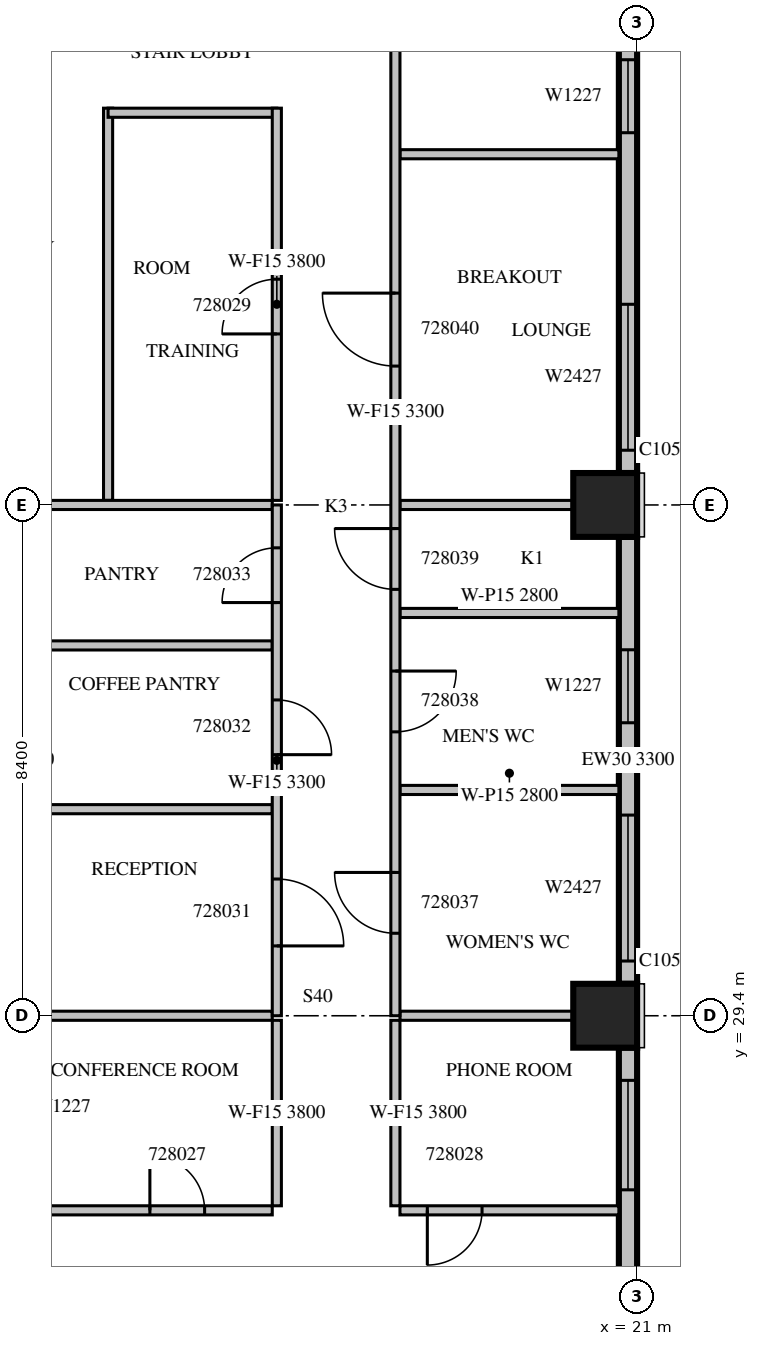
"""IFC4 building model, lengths in metres.
Left out: names, types, materials, properties, quantities, classifications, styles, units other than length and angle.
Written with IfcOpenShell. Run it as: python <this file> out.ifc"""

import sys

from ifc_helpers import new_model, si_unit, direction, frame, frame_2d, origin, origin_2d, place, context, subcontext, project, spatial, rectangle, extrude, source, transform, mapped, element, fill, save


model = new_model("IFC4")
c1 = context("Model", 3, precision=1e-05, world=origin(), true_north=direction((0.0, 1.0)))
c2 = subcontext(c1, "Body", "Model", "MODEL_VIEW")
j1 = project(units=[si_unit("LENGTHUNIT", "METRE"), si_unit("PLANEANGLEUNIT", "RADIAN")], contexts=[c1])
p1 = place(None, origin())
s1 = spatial("IfcSite", under=j1, at=p1, CompositionType="ELEMENT")
p2 = place(p1, origin())
s2 = spatial("IfcBuilding", under=s1, at=p2, CompositionType="ELEMENT")
p3 = place(p2, frame((0.0, 0.0, 128.7)))
s3 = spatial("IfcBuildingStorey", under=s2, at=p3, CompositionType="ELEMENT", Elevation=128.7)
m1 = source(origin(), c2, "Body", "SweptSolid", [
    extrude(rectangle(XDim=1.05, YDim=1.05, at=origin_2d()), origin(), (0.0, 0.0, 1.0), 4.2),
])
for number, where, z_axis, x_axis in (
    (1, (20.475, 29.4, 0.0), (0.0, 0.0, 1.0), (1.0, 0.0, 0.0)),
    (2, (20.475, 37.8, 0.0), (0.0, 0.0, 1.0), (1.0, 0.0, 0.0)),
):
    element("IfcColumn", number, at=place(p3, frame(where, z_axis=z_axis, x_axis=x_axis)), inside=s3, PredefinedType="COLUMN", context=c2, shape_type="MappedRepresentation", body=[
        mapped(m1, transform((0.0, 0.0, 0.0), scale=1.0)),
    ])
m2 = source(origin(), c2, "Body", "SweptSolid", [
    extrude(rectangle(XDim=6.875, YDim=0.3, at=frame_2d((3.438, 0.0))), origin(), (0.0, 0.0, 1.0), 3.8),
])
p4 = place(p3, frame((20.85, 22.0, 0.0), z_axis=(0.0, 0.0, 1.0), x_axis=(0.0, 1.0, 0.0)))
e3 = element("IfcWall", 3, at=p4, inside=s3, PredefinedType="STANDARD", context=c2, shape_type="MappedRepresentation", body=[
    mapped(m2, transform((0.0, 0.0, 0.0), scale=1.0)),
])
m3 = source(origin(), c2, "Body", "SweptSolid", [
    extrude(rectangle(XDim=1.8, YDim=2.7, at=frame_2d((0.9, 1.35))), frame((0.0, 0.16, 0.0), z_axis=(0.0, -1.0, 0.0), x_axis=(1.0, 0.0, 0.0)), (0.0, 0.0, 1.0), 0.32),
])
p5 = place(p4, frame((0.2, 0.0, 0.6)))
e4 = element("IfcOpeningElement", 4, at=p5, cuts=e3, PredefinedType="OPENING", context=c2, shape_type="MappedRepresentation", body=[
    mapped(m3, transform((0.0, 0.0, 0.0), scale=1.0)),
])
p6 = place(p4, frame((4.537, 0.0, 0.6)))
e5 = element("IfcOpeningElement", 5, at=p6, cuts=e3, PredefinedType="OPENING", context=c2, shape_type="MappedRepresentation", body=[
    mapped(m3, transform((0.0, 0.0, 0.0), scale=1.0)),
])
m4 = source(origin(), c2, "Body", "SweptSolid", [
    extrude(rectangle(XDim=7.35, YDim=0.3, at=frame_2d((3.675, 0.0))), origin(), (0.0, 0.0, 1.0), 3.3),
])
p7 = place(p3, frame((20.85, 29.925, 0.0), z_axis=(0.0, 0.0, 1.0), x_axis=(0.0, 1.0, 0.0)))
e6 = element("IfcWall", 6, at=p7, inside=s3, PredefinedType="STANDARD", context=c2, shape_type="MappedRepresentation", body=[
    mapped(m4, transform((0.0, 0.0, 0.0), scale=1.0)),
])
m5 = source(origin(), c2, "Body", "SweptSolid", [
    extrude(rectangle(XDim=2.4, YDim=2.7, at=frame_2d((1.2, 1.35))), frame((0.0, 0.16, 0.0), z_axis=(0.0, -1.0, 0.0), x_axis=(1.0, 0.0, 0.0)), (0.0, 0.0, 1.0), 0.32),
])
p8 = place(p7, frame((0.375, 0.0, 0.6)))
e7 = element("IfcOpeningElement", 7, at=p8, cuts=e6, PredefinedType="OPENING", context=c2, shape_type="MappedRepresentation", body=[
    mapped(m5, transform((0.0, 0.0, 0.0), scale=1.0)),
])
m6 = source(origin(), c2, "Body", "SweptSolid", [
    extrude(rectangle(XDim=1.2, YDim=2.7, at=frame_2d((0.6, 1.35))), frame((0.0, 0.16, 0.0), z_axis=(0.0, -1.0, 0.0), x_axis=(1.0, 0.0, 0.0)), (0.0, 0.0, 1.0), 0.32),
])
p9 = place(p7, frame((4.293, 0.0, 0.6)))
e8 = element("IfcOpeningElement", 8, at=p9, cuts=e6, PredefinedType="OPENING", context=c2, shape_type="MappedRepresentation", body=[
    mapped(m6, transform((0.0, 0.0, 0.0), scale=1.0)),
])
m7 = source(origin(), c2, "Body", "SweptSolid", [
    extrude(rectangle(XDim=7.35, YDim=0.3, at=frame_2d((3.675, 0.0))), origin(), (0.0, 0.0, 1.0), 3.8),
])
p10 = place(p3, frame((20.85, 38.325, 0.0), z_axis=(0.0, 0.0, 1.0), x_axis=(0.0, 1.0, 0.0)))
e9 = element("IfcWall", 9, at=p10, inside=s3, PredefinedType="STANDARD", context=c2, shape_type="MappedRepresentation", body=[
    mapped(m7, transform((0.0, 0.0, 0.0), scale=1.0)),
])
p11 = place(p10, frame((0.375, 0.0, 0.6)))
e10 = element("IfcOpeningElement", 10, at=p11, cuts=e9, PredefinedType="OPENING", context=c2, shape_type="MappedRepresentation", body=[
    mapped(m5, transform((0.0, 0.0, 0.0), scale=1.0)),
])
p12 = place(p10, frame((5.596, 0.0, 0.6)))
e11 = element("IfcOpeningElement", 11, at=p12, cuts=e9, PredefinedType="OPENING", context=c2, shape_type="MappedRepresentation", body=[
    mapped(m6, transform((0.0, 0.0, 0.0), scale=1.0)),
])
m8 = source(origin(), c2, "Body", "SweptSolid", [
    extrude(rectangle(XDim=4.295, YDim=0.15, at=frame_2d((2.147, 0.0))), origin(), (0.0, 0.0, 1.0), 3.8),
])
p13 = place(p3, frame((10.705, 26.2, 0.0), z_axis=(0.0, 0.0, 1.0), x_axis=(1.0, 0.0, 0.0)))
e12 = element("IfcWall", 12, at=p13, inside=s3, PredefinedType="PARTITIONING", context=c2, shape_type="MappedRepresentation", body=[
    mapped(m8, transform((0.0, 0.0, 0.0), scale=1.0)),
])
m9 = source(origin(), c2, "Body", "SweptSolid", [
    extrude(rectangle(XDim=0.9, YDim=2.1, at=frame_2d((0.45, 1.05))), frame((0.0, 0.085, 0.0), z_axis=(0.0, -1.0, 0.0), x_axis=(1.0, 0.0, 0.0)), (0.0, 0.0, 1.0), 0.17),
])
p14 = place(p13, frame((2.283, 0.0, 0.0)))
e13 = element("IfcOpeningElement", 13, at=p14, cuts=e12, PredefinedType="OPENING", context=c2, shape_type="MappedRepresentation", body=[
    mapped(m9, transform((0.0, 0.0, 0.0), scale=1.0)),
])
m10 = source(origin(), c2, "Body", "SweptSolid", [
    extrude(rectangle(XDim=3.6, YDim=0.15, at=frame_2d((1.8, 0.0))), origin(), (0.0, 0.0, 1.0), 3.8),
])
p15 = place(p3, frame((17.1, 26.2, 0.0), z_axis=(0.0, 0.0, 1.0), x_axis=(1.0, 0.0, 0.0)))
e14 = element("IfcWall", 14, at=p15, inside=s3, PredefinedType="PARTITIONING", context=c2, shape_type="MappedRepresentation", body=[
    mapped(m10, transform((0.0, 0.0, 0.0), scale=1.0)),
])
p16 = place(p15, frame((0.45, 0.0, 0.0)))
e15 = element("IfcOpeningElement", 15, at=p16, cuts=e14, PredefinedType="OPENING", context=c2, shape_type="MappedRepresentation", body=[
    mapped(m9, transform((0.0, 0.0, 0.0), scale=1.0)),
])
m11 = source(origin(), c2, "Body", "SweptSolid", [
    extrude(rectangle(XDim=3.05, YDim=0.15, at=frame_2d((1.525, 0.0))), origin(), (0.0, 0.0, 1.0), 3.8),
])
for number, where, z_axis, x_axis in (
    (16, (15.075, 26.275, 0.0), (0.0, 0.0, 1.0), (0.0, 1.0, 0.0)),
    (17, (17.025, 29.325, 0.0), (0.0, 0.0, 1.0), (0.0, -1.0, 0.0)),
):
    element("IfcWall", number, at=place(p3, frame(where, z_axis=z_axis, x_axis=x_axis)), inside=s3, PredefinedType="PARTITIONING", context=c2, shape_type="MappedRepresentation", body=[
        mapped(m11, transform((0.0, 0.0, 0.0), scale=1.0)),
    ])
m12 = source(origin(), c2, "Body", "SweptSolid", [
    extrude(rectangle(XDim=3.976, YDim=0.15, at=frame_2d((1.988, 0.0))), origin(), (0.0, 0.0, 1.0), 3.8),
])
p17 = place(p3, frame((15.0, 29.4, 0.0), z_axis=(0.0, 0.0, 1.0), x_axis=(-1.0, 0.0, 0.0)))
e18 = element("IfcWall", 18, at=p17, inside=s3, PredefinedType="PARTITIONING", context=c2, shape_type="MappedRepresentation", body=[
    mapped(m12, transform((0.0, 0.0, 0.0), scale=1.0)),
])
m13 = source(origin(), c2, "Body", "SweptSolid", [
    extrude(rectangle(XDim=2.851, YDim=0.15, at=frame_2d((1.425, 0.0))), origin(), (0.0, 0.0, 1.0), 3.8),
])
p18 = place(p3, frame((19.951, 29.4, 0.0), z_axis=(0.0, 0.0, 1.0), x_axis=(-1.0, 0.0, 0.0)))
e19 = element("IfcWall", 19, at=p18, inside=s3, PredefinedType="PARTITIONING", context=c2, shape_type="MappedRepresentation", body=[
    mapped(m13, transform((0.0, 0.0, 0.0), scale=1.0)),
])
m14 = source(origin(), c2, "Body", "SweptSolid", [
    extrude(rectangle(XDim=6.45, YDim=0.15, at=frame_2d((3.225, 0.0))), origin(), (0.0, 0.0, 1.0), 3.8),
])
p19 = place(p3, frame((12.3, 44.325, 0.0), z_axis=(0.0, 0.0, 1.0), x_axis=(0.0, -1.0, 0.0)))
e20 = element("IfcWall", 20, at=p19, inside=s3, PredefinedType="PARTITIONING", context=c2, shape_type="MappedRepresentation", body=[
    mapped(m14, transform((0.0, 0.0, 0.0), scale=1.0)),
])
m15 = source(origin(), c2, "Body", "SweptSolid", [
    extrude(rectangle(XDim=2.775, YDim=0.15, at=frame_2d((1.387, 0.0))), origin(), (0.0, 0.0, 1.0), 3.8),
])
p20 = place(p3, frame((15.075, 44.25, 0.0), z_axis=(0.0, 0.0, 1.0), x_axis=(-1.0, 0.0, 0.0)))
e21 = element("IfcWall", 21, at=p20, inside=s3, PredefinedType="PARTITIONING", context=c2, shape_type="MappedRepresentation", body=[
    mapped(m15, transform((0.0, 0.0, 0.0), scale=1.0)),
])
p21 = place(p3, frame((15.075, 37.875, 0.0), z_axis=(0.0, 0.0, 1.0), x_axis=(0.0, 1.0, 0.0)))
e22 = element("IfcWall", 22, at=p21, inside=s3, PredefinedType="PARTITIONING", context=c2, shape_type="MappedRepresentation", body=[
    mapped(m14, transform((0.0, 0.0, 0.0), scale=1.0)),
])
p22 = place(p21, frame((2.737, 0.0, 0.0)))
e23 = element("IfcOpeningElement", 23, at=p22, cuts=e22, PredefinedType="OPENING", context=c2, shape_type="MappedRepresentation", body=[
    mapped(m9, transform((0.0, 0.0, 0.0), scale=1.0)),
])
for number, where, z_axis, x_axis in (
    (24, (15.0, 32.797, 0.0), (0.0, 0.0, 1.0), (-1.0, 0.0, 0.0)),
    (25, (15.0, 35.49, 0.0), (0.0, 0.0, 1.0), (-1.0, 0.0, 0.0)),
):
    element("IfcWall", number, at=place(p3, frame(where, z_axis=z_axis, x_axis=x_axis)), inside=s3, PredefinedType="PARTITIONING", context=c2, shape_type="MappedRepresentation", body=[
        mapped(m8, transform((0.0, 0.0, 0.0), scale=1.0)),
    ])
p23 = place(p3, frame((15.0, 37.8, 0.0), z_axis=(0.0, 0.0, 1.0), x_axis=(-1.0, 0.0, 0.0)))
e26 = element("IfcWall", 26, at=p23, inside=s3, PredefinedType="PARTITIONING", context=c2, shape_type="MappedRepresentation", body=[
    mapped(m12, transform((0.0, 0.0, 0.0), scale=1.0)),
])
m16 = source(origin(), c2, "Body", "SweptSolid", [
    extrude(rectangle(XDim=3.6, YDim=0.15, at=frame_2d((1.8, 0.0))), origin(), (0.0, 0.0, 1.0), 2.8),
])
for number, where, z_axis, x_axis in (
    (27, (17.1, 33.113, 0.0), (0.0, 0.0, 1.0), (1.0, 0.0, 0.0)),
    (28, (17.1, 36.024, 0.0), (0.0, 0.0, 1.0), (1.0, 0.0, 0.0)),
):
    element("IfcWall", number, at=place(p3, frame(where, z_axis=z_axis, x_axis=x_axis)), inside=s3, PredefinedType="PARTITIONING", context=c2, shape_type="MappedRepresentation", body=[
        mapped(m16, transform((0.0, 0.0, 0.0), scale=1.0)),
    ])
p24 = place(p3, frame((17.1, 43.568, 0.0), z_axis=(0.0, 0.0, 1.0), x_axis=(1.0, 0.0, 0.0)))
e29 = element("IfcWall", 29, at=p24, inside=s3, PredefinedType="PARTITIONING", context=c2, shape_type="MappedRepresentation", body=[
    mapped(m10, transform((0.0, 0.0, 0.0), scale=1.0)),
])
p25 = place(p3, frame((19.951, 37.8, 0.0), z_axis=(0.0, 0.0, 1.0), x_axis=(-1.0, 0.0, 0.0)))
e30 = element("IfcWall", 30, at=p25, inside=s3, PredefinedType="PARTITIONING", context=c2, shape_type="MappedRepresentation", body=[
    mapped(m13, transform((0.0, 0.0, 0.0), scale=1.0)),
])
m17 = source(origin(), c2, "Body", "SweptSolid", [
    extrude(rectangle(XDim=8.4, YDim=0.15, at=frame_2d((4.2, 0.0))), origin(), (0.0, 0.0, 1.0), 3.3),
])
p26 = place(p3, frame((15.075, 29.4, 0.0), z_axis=(0.0, 0.0, 1.0), x_axis=(0.0, 1.0, 0.0)))
e31 = element("IfcWall", 31, at=p26, inside=s3, PredefinedType="PARTITIONING", context=c2, shape_type="MappedRepresentation", body=[
    mapped(m17, transform((0.0, 0.0, 0.0), scale=1.0)),
])
m18 = source(origin(), c2, "Body", "SweptSolid", [
    extrude(rectangle(XDim=1.1, YDim=2.1, at=frame_2d((0.55, 1.05))), frame((0.0, 0.085, 0.0), z_axis=(0.0, -1.0, 0.0), x_axis=(1.0, 0.0, 0.0)), (0.0, 0.0, 1.0), 0.17),
])
p27 = place(p26, frame((1.149, 0.0, 0.0)))
e32 = element("IfcOpeningElement", 32, at=p27, cuts=e31, PredefinedType="OPENING", context=c2, shape_type="MappedRepresentation", body=[
    mapped(m18, transform((0.0, 0.0, 0.0), scale=1.0)),
])
p28 = place(p26, frame((4.293, 0.0, 0.0)))
e33 = element("IfcOpeningElement", 33, at=p28, cuts=e31, PredefinedType="OPENING", context=c2, shape_type="MappedRepresentation", body=[
    mapped(m9, transform((0.0, 0.0, 0.0), scale=1.0)),
])
p29 = place(p26, frame((6.795, 0.0, 0.0)))
e34 = element("IfcOpeningElement", 34, at=p29, cuts=e31, PredefinedType="OPENING", context=c2, shape_type="MappedRepresentation", body=[
    mapped(m9, transform((0.0, 0.0, 0.0), scale=1.0)),
])
m19 = source(origin(), c2, "Body", "SweptSolid", [
    extrude(rectangle(XDim=19.86, YDim=0.15, at=frame_2d((9.93, 0.0))), origin(), (0.0, 0.0, 1.0), 3.3),
])
p30 = place(p3, frame((17.025, 49.26, 0.0), z_axis=(0.0, 0.0, 1.0), x_axis=(0.0, -1.0, 0.0)))
e35 = element("IfcWall", 35, at=p30, inside=s3, PredefinedType="PARTITIONING", context=c2, shape_type="MappedRepresentation", body=[
    mapped(m19, transform((0.0, 0.0, 0.0), scale=1.0)),
])
m20 = source(origin(), c2, "Body", "SweptSolid", [
    extrude(rectangle(XDim=1.0, YDim=2.1, at=frame_2d((0.5, 1.05))), frame((0.0, 0.085, 0.0), z_axis=(0.0, -1.0, 0.0), x_axis=(1.0, 0.0, 0.0)), (0.0, 0.0, 1.0), 0.17),
])
p31 = place(p30, frame((17.503, 0.0, 0.0)))
e36 = element("IfcOpeningElement", 36, at=p31, cuts=e35, PredefinedType="OPENING", context=c2, shape_type="MappedRepresentation", body=[
    mapped(m20, transform((0.0, 0.0, 0.0), scale=1.0)),
])
p32 = place(p30, frame((14.191, 0.0, 0.0)))
e37 = element("IfcOpeningElement", 37, at=p32, cuts=e35, PredefinedType="OPENING", context=c2, shape_type="MappedRepresentation", body=[
    mapped(m20, transform((0.0, 0.0, 0.0), scale=1.0)),
])
p33 = place(p30, frame((11.848, 0.0, 0.0)))
e38 = element("IfcOpeningElement", 38, at=p33, cuts=e35, PredefinedType="OPENING", context=c2, shape_type="MappedRepresentation", body=[
    mapped(m20, transform((0.0, 0.0, 0.0), scale=1.0)),
])
m21 = source(origin(), c2, "Body", "SweptSolid", [
    extrude(rectangle(XDim=1.2, YDim=2.1, at=frame_2d((0.6, 1.05))), frame((0.0, 0.085, 0.0), z_axis=(0.0, -1.0, 0.0), x_axis=(1.0, 0.0, 0.0)), (0.0, 0.0, 1.0), 0.17),
])
p34 = place(p30, frame((7.976, 0.0, 0.0)))
e39 = element("IfcOpeningElement", 39, at=p34, cuts=e35, PredefinedType="OPENING", context=c2, shape_type="MappedRepresentation", body=[
    mapped(m21, transform((0.0, 0.0, 0.0), scale=1.0)),
])
p35 = place(p30, frame((2.209, 0.0, 0.0)))
e40 = element("IfcOpeningElement", 40, at=p35, cuts=e35, PredefinedType="OPENING", context=c2, shape_type="MappedRepresentation", body=[
    mapped(m21, transform((0.0, 0.0, 0.0), scale=1.0)),
])
m22 = source(origin(), c2, "Body", "SweptSolid", [
    extrude(rectangle(XDim=1.8, YDim=2.7, at=frame_2d((0.9, 1.35))), frame((0.0, 0.03, 0.0), z_axis=(0.0, -1.0, 0.0), x_axis=(1.0, 0.0, 0.0)), (0.0, 0.0, 1.0), 0.06),
])
p36 = place(p6, origin())
e41 = element("IfcWindow", 41, at=p36, inside=s3, PartitioningType="SINGLE_PANEL", PredefinedType="WINDOW", context=c2, shape_type="MappedRepresentation", body=[
    mapped(m22, transform((0.0, 0.0, 0.0), scale=1.0)),
])
fill(e5, e41)
m23 = source(origin(), c2, "Body", "SweptSolid", [
    extrude(rectangle(XDim=2.4, YDim=2.7, at=frame_2d((1.2, 1.35))), frame((0.0, 0.03, 0.0), z_axis=(0.0, -1.0, 0.0), x_axis=(1.0, 0.0, 0.0)), (0.0, 0.0, 1.0), 0.06),
])
p37 = place(p8, origin())
e42 = element("IfcWindow", 42, at=p37, inside=s3, PartitioningType="SINGLE_PANEL", PredefinedType="WINDOW", context=c2, shape_type="MappedRepresentation", body=[
    mapped(m23, transform((0.0, 0.0, 0.0), scale=1.0)),
])
fill(e7, e42)
m24 = source(origin(), c2, "Body", "SweptSolid", [
    extrude(rectangle(XDim=1.2, YDim=2.7, at=frame_2d((0.6, 1.35))), frame((0.0, 0.03, 0.0), z_axis=(0.0, -1.0, 0.0), x_axis=(1.0, 0.0, 0.0)), (0.0, 0.0, 1.0), 0.06),
])
p38 = place(p9, origin())
e43 = element("IfcWindow", 43, at=p38, inside=s3, PartitioningType="SINGLE_PANEL", PredefinedType="WINDOW", context=c2, shape_type="MappedRepresentation", body=[
    mapped(m24, transform((0.0, 0.0, 0.0), scale=1.0)),
])
fill(e8, e43)
p39 = place(p11, origin())
e44 = element("IfcWindow", 44, at=p39, inside=s3, PartitioningType="SINGLE_PANEL", PredefinedType="WINDOW", context=c2, shape_type="MappedRepresentation", body=[
    mapped(m23, transform((0.0, 0.0, 0.0), scale=1.0)),
])
fill(e10, e44)
p40 = place(p12, origin())
e45 = element("IfcWindow", 45, at=p40, inside=s3, PartitioningType="SINGLE_PANEL", PredefinedType="WINDOW", context=c2, shape_type="MappedRepresentation", body=[
    mapped(m24, transform((0.0, 0.0, 0.0), scale=1.0)),
])
fill(e11, e45)
m25 = source(origin(), c2, "Body", "SweptSolid", [
    extrude(rectangle(XDim=0.9, YDim=2.1, at=frame_2d((0.45, 1.05))), frame((0.0, 0.025, 0.0), z_axis=(0.0, -1.0, 0.0), x_axis=(1.0, 0.0, 0.0)), (0.0, 0.0, 1.0), 0.05),
])
p41 = place(p14, origin())
e46 = element("IfcDoor", 46, at=p41, inside=s3, OperationType="SINGLE_SWING_LEFT", PredefinedType="DOOR", context=c2, shape_type="MappedRepresentation", body=[
    mapped(m25, transform((0.0, 0.0, 0.0), scale=1.0)),
])
fill(e13, e46)
p42 = place(p16, origin())
e47 = element("IfcDoor", 47, at=p42, inside=s3, OperationType="SINGLE_SWING_RIGHT", PredefinedType="DOOR", context=c2, shape_type="MappedRepresentation", body=[
    mapped(m25, transform((0.0, 0.0, 0.0), scale=1.0)),
])
fill(e15, e47)
p43 = place(p22, origin())
e48 = element("IfcDoor", 48, at=p43, inside=s3, OperationType="SINGLE_SWING_LEFT", PredefinedType="DOOR", context=c2, shape_type="MappedRepresentation", body=[
    mapped(m25, transform((0.0, 0.0, 0.0), scale=1.0)),
])
fill(e23, e48)
m26 = source(origin(), c2, "Body", "SweptSolid", [
    extrude(rectangle(XDim=1.1, YDim=2.1, at=frame_2d((0.55, 1.05))), frame((0.0, 0.025, 0.0), z_axis=(0.0, -1.0, 0.0), x_axis=(1.0, 0.0, 0.0)), (0.0, 0.0, 1.0), 0.05),
])
p44 = place(p27, origin())
e49 = element("IfcDoor", 49, at=p44, inside=s3, OperationType="SINGLE_SWING_RIGHT", PredefinedType="DOOR", context=c2, shape_type="MappedRepresentation", body=[
    mapped(m26, transform((0.0, 0.0, 0.0), scale=1.0)),
])
fill(e32, e49)
p45 = place(p28, origin())
e50 = element("IfcDoor", 50, at=p45, inside=s3, OperationType="SINGLE_SWING_RIGHT", PredefinedType="DOOR", context=c2, shape_type="MappedRepresentation", body=[
    mapped(m25, transform((0.0, 0.0, 0.0), scale=1.0)),
])
fill(e33, e50)
p46 = place(p29, origin())
e51 = element("IfcDoor", 51, at=p46, inside=s3, OperationType="SINGLE_SWING_LEFT", PredefinedType="DOOR", context=c2, shape_type="MappedRepresentation", body=[
    mapped(m25, transform((0.0, 0.0, 0.0), scale=1.0)),
])
fill(e34, e51)
m27 = source(origin(), c2, "Body", "SweptSolid", [
    extrude(rectangle(XDim=1.0, YDim=2.1, at=frame_2d((0.5, 1.05))), frame((0.0, 0.025, 0.0), z_axis=(0.0, -1.0, 0.0), x_axis=(1.0, 0.0, 0.0)), (0.0, 0.0, 1.0), 0.05),
])
p47 = place(p31, origin())
e52 = element("IfcDoor", 52, at=p47, inside=s3, OperationType="SINGLE_SWING_RIGHT", PredefinedType="DOOR", context=c2, shape_type="MappedRepresentation", body=[
    mapped(m27, transform((0.0, 0.0, 0.0), scale=1.0)),
])
fill(e36, e52)
p48 = place(p32, origin())
e53 = element("IfcDoor", 53, at=p48, inside=s3, OperationType="SINGLE_SWING_LEFT", PredefinedType="DOOR", context=c2, shape_type="MappedRepresentation", body=[
    mapped(m27, transform((0.0, 0.0, 0.0), scale=1.0)),
])
fill(e37, e53)
p49 = place(p33, origin())
e54 = element("IfcDoor", 54, at=p49, inside=s3, OperationType="SINGLE_SWING_RIGHT", PredefinedType="DOOR", context=c2, shape_type="MappedRepresentation", body=[
    mapped(m27, transform((0.0, 0.0, 0.0), scale=1.0)),
])
fill(e38, e54)
m28 = source(origin(), c2, "Body", "SweptSolid", [
    extrude(rectangle(XDim=1.2, YDim=2.1, at=frame_2d((0.6, 1.05))), frame((0.0, 0.025, 0.0), z_axis=(0.0, -1.0, 0.0), x_axis=(1.0, 0.0, 0.0)), (0.0, 0.0, 1.0), 0.05),
])
p50 = place(p34, origin())
e55 = element("IfcDoor", 55, at=p50, inside=s3, OperationType="SINGLE_SWING_RIGHT", PredefinedType="DOOR", context=c2, shape_type="MappedRepresentation", body=[
    mapped(m28, transform((0.0, 0.0, 0.0), scale=1.0)),
])
fill(e39, e55)
save(model, sys.argv[1])
